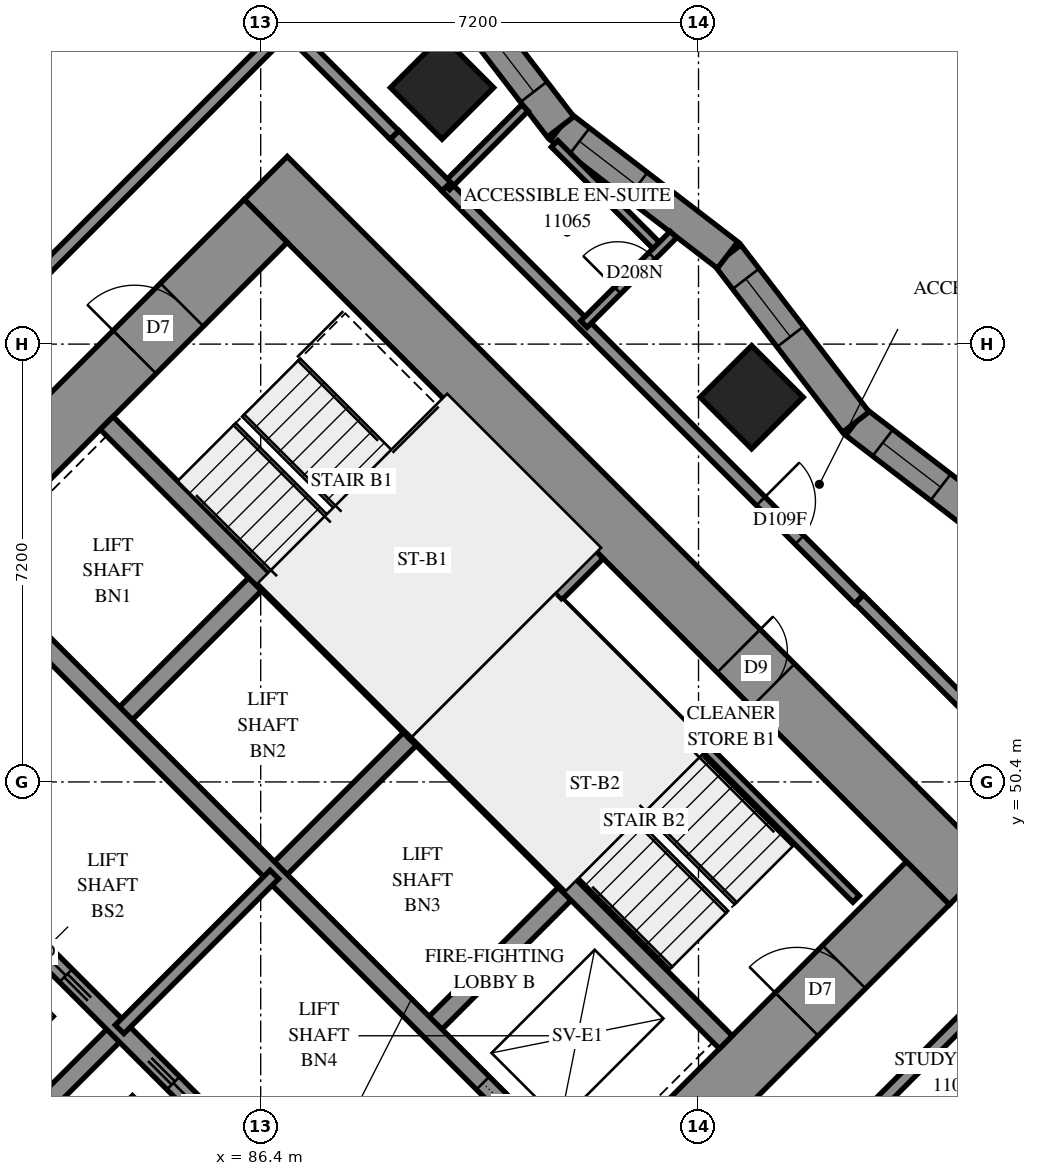
"""IFC4 building model, lengths in metres.
Left out: names, types, materials, properties, quantities, classifications, styles, units other than length and angle.
Written with IfcOpenShell. Run it as: python <this file> out.ifc"""

import sys

from ifc_helpers import new_model, si_unit, direction, frame, frame_2d, origin, origin_2d, place, context, subcontext, project, spatial, polyline, rectangle, outline, extrude, element, fill, save


model = new_model("IFC4")
c1 = context("Model", 3, precision=1e-05, world=origin(), true_north=direction((0.0, 1.0)))
c2 = subcontext(c1, "Body", "Model", "MODEL_VIEW")
j1 = project(units=[si_unit("LENGTHUNIT", "METRE"), si_unit("PLANEANGLEUNIT", "RADIAN")], contexts=[c1])
p1 = place(None, origin())
s1 = spatial("IfcSite", under=j1, at=p1, CompositionType="ELEMENT")
p2 = place(p1, origin())
s2 = spatial("IfcBuilding", under=s1, at=p2, CompositionType="ELEMENT")
p3 = place(p2, frame((0.0, 0.0, 44.0)))
s3 = spatial("IfcBuildingStorey", under=s2, at=p3, CompositionType="ELEMENT", Elevation=44.0)
for number, where, z_axis, x_axis in (
    (1, (89.382, 61.818, 0.0), (0.0, 0.0, 1.0), (0.707, -0.707, 0.0)),
    (2, (94.474, 56.727, 0.0), (0.0, 0.0, 1.0), (0.707, -0.707, 0.0)),
):
    element("IfcColumn", number, at=place(p3, frame(where, z_axis=z_axis, x_axis=x_axis)), inside=s3, PredefinedType="COLUMN", context=c2, shape_type="SweptSolid", body=[
        extrude(rectangle(XDim=1.2, YDim=1.2, at=origin_2d()), origin(), (0.0, 0.0, 1.0), 3.1),
    ])
p4 = place(p3, frame((75.594, 49.443, -0.3), z_axis=(0.0, 0.0, 1.0), x_axis=(0.7071037324, -0.70710983, 0.0)))
e3 = element("IfcWall", 3, at=p4, inside=s3, PredefinedType="SHEAR", context=c2, shape_type="SweptSolid", body=[
    extrude(rectangle(XDim=16.4, YDim=1.0, at=frame_2d((8.2, 0.0))), origin(), (0.0, 0.0, 1.0), 2.7),
])
p5 = place(p3, frame((86.483, 60.333, -0.3), z_axis=(0.0, 0.0, 1.0), x_axis=(0.70710983, -0.7071037324, 0.0)))
e4 = element("IfcWall", 4, at=p5, inside=s3, PredefinedType="SHEAR", context=c2, shape_type="SweptSolid", body=[
    extrude(rectangle(XDim=16.4, YDim=1.0, at=frame_2d((8.2, 0.0))), origin(), (0.0, 0.0, 1.0), 2.7),
])
p6 = place(p5, frame((11.0, 0.0, 0.3)))
e5 = element("IfcOpeningElement", 5, at=p6, cuts=e4, PredefinedType="OPENING", context=c2, shape_type="SweptSolid", body=[
    extrude(rectangle(XDim=0.8, YDim=2.1, at=frame_2d((0.4, 1.05))), frame((0.0, 0.51, 0.0), z_axis=(0.0, -1.0, 0.0), x_axis=(1.0, 0.0, 0.0)), (0.0, 0.0, 1.0), 1.02),
])
p7 = place(p3, frame((76.301, 49.443, -0.3), z_axis=(0.0, 0.0, 1.0), x_axis=(0.7071067812, 0.7071067812, 0.0)))
e6 = element("IfcWall", 6, at=p7, inside=s3, PredefinedType="SHEAR", context=c2, shape_type="SweptSolid", body=[
    extrude(rectangle(XDim=14.4, YDim=1.0, at=frame_2d((7.2, 0.0))), origin(), (0.0, 0.0, 1.0), 2.7),
])
p8 = place(p7, frame((4.55, 0.0, 0.3)))
e7 = element("IfcOpeningElement", 7, at=p8, cuts=e6, PredefinedType="OPENING", context=c2, shape_type="SweptSolid", body=[
    extrude(rectangle(XDim=1.1, YDim=2.1, at=frame_2d((0.55, 1.05))), frame((0.0, 0.51, 0.0), z_axis=(0.0, -1.0, 0.0), x_axis=(1.0, 0.0, 0.0)), (0.0, 0.0, 1.0), 1.02),
])
p9 = place(p7, frame((11.35, 0.0, 0.3)))
e8 = element("IfcOpeningElement", 8, at=p9, cuts=e6, PredefinedType="OPENING", context=c2, shape_type="SweptSolid", body=[
    extrude(rectangle(XDim=1.1, YDim=2.1, at=frame_2d((0.55, 1.05))), frame((0.0, 0.51, 0.0), z_axis=(0.0, -1.0, 0.0), x_axis=(1.0, 0.0, 0.0)), (0.0, 0.0, 1.0), 1.02),
])
p10 = place(p3, frame((87.19, 38.554, -0.3), z_axis=(0.0, 0.0, 1.0), x_axis=(0.707103309, 0.7071102534, 0.0)))
e9 = element("IfcWall", 9, at=p10, inside=s3, PredefinedType="SHEAR", context=c2, shape_type="SweptSolid", body=[
    extrude(rectangle(XDim=14.4, YDim=1.0, at=frame_2d((7.2, 0.0))), origin(), (0.0, 0.0, 1.0), 2.7),
])
p11 = place(p10, frame((4.55, 0.0, 0.3)))
e10 = element("IfcOpeningElement", 10, at=p11, cuts=e9, PredefinedType="OPENING", context=c2, shape_type="SweptSolid", body=[
    extrude(rectangle(XDim=1.1, YDim=2.1, at=frame_2d((0.55, 1.05))), frame((0.0, 0.51, 0.0), z_axis=(0.0, -1.0, 0.0), x_axis=(1.0, 0.0, 0.0)), (0.0, 0.0, 1.0), 1.02),
])
p12 = place(p10, frame((11.35, 0.0, 0.3)))
e11 = element("IfcOpeningElement", 11, at=p12, cuts=e9, PredefinedType="OPENING", context=c2, shape_type="SweptSolid", body=[
    extrude(rectangle(XDim=1.1, YDim=2.1, at=frame_2d((0.55, 1.05))), frame((0.0, 0.51, 0.0), z_axis=(0.0, -1.0, 0.0), x_axis=(1.0, 0.0, 0.0)), (0.0, 0.0, 1.0), 1.02),
])
p13 = place(p3, frame((84.079, 51.423, 0.0), z_axis=(0.0, 0.0, 1.0), x_axis=(0.7071219326, 0.7070916295, 0.0)))
e12 = element("IfcWall", 12, at=p13, inside=s3, PredefinedType="SOLIDWALL", context=c2, shape_type="SweptSolid", body=[
    extrude(rectangle(XDim=3.3, YDim=0.3, at=frame_2d((1.65, 0.0))), origin(), (0.0, 0.0, 1.0), 3.1),
])
p14 = place(p3, frame((81.746, 43.999, 0.0), z_axis=(0.0, 0.0, 1.0), x_axis=(0.7071067812, 0.7071067812, 0.0)))
e13 = element("IfcWall", 13, at=p14, inside=s3, PredefinedType="SOLIDWALL", context=c2, shape_type="SweptSolid", body=[
    extrude(rectangle(XDim=3.3, YDim=0.3, at=frame_2d((1.65, 0.0))), origin(), (0.0, 0.0, 1.0), 3.1),
])
for number, where, z_axis, x_axis in (
    (14, (86.625, 48.878, 0.0), (0.0, 0.0, 1.0), (0.707, 0.707, 0.0)),
    (15, (89.17, 46.332, 0.0), (0.0, 0.0, 1.0), (0.707, 0.707, 0.0)),
):
    element("IfcWall", number, at=place(p3, frame(where, z_axis=z_axis, x_axis=x_axis)), inside=s3, PredefinedType="SOLIDWALL", context=c2, shape_type="SweptSolid", body=[
        extrude(rectangle(XDim=3.3, YDim=0.3, at=frame_2d((1.65, 0.0))), origin(), (0.0, 0.0, 1.0), 3.1),
    ])
p15 = place(p3, frame((78.988, 51.423, 0.0), z_axis=(0.0, 0.0, 1.0), x_axis=(0.7071067812, -0.7071067812, 0.0)))
e16 = element("IfcWall", 16, at=p15, inside=s3, PredefinedType="SOLIDWALL", context=c2, shape_type="SweptSolid", body=[
    extrude(rectangle(XDim=14.4, YDim=0.3, at=frame_2d((7.2, 0.0))), origin(), (0.0, 0.0, 1.0), 3.1),
])
p16 = place(p15, frame((1.25, 0.0, 0.0)))
e17 = element("IfcOpeningElement", 17, at=p16, cuts=e16, PredefinedType="OPENING", context=c2, shape_type="SweptSolid", body=[
    extrude(rectangle(XDim=1.1, YDim=2.1, at=frame_2d((0.55, 1.05))), frame((0.0, 0.16, 0.0), z_axis=(0.0, -1.0, 0.0), x_axis=(1.0, 0.0, 0.0)), (0.0, 0.0, 1.0), 0.32),
])
p17 = place(p15, frame((4.85, 0.0, 0.0)))
e18 = element("IfcOpeningElement", 18, at=p17, cuts=e16, PredefinedType="OPENING", context=c2, shape_type="SweptSolid", body=[
    extrude(rectangle(XDim=1.1, YDim=2.1, at=frame_2d((0.55, 1.05))), frame((0.0, 0.16, 0.0), z_axis=(0.0, -1.0, 0.0), x_axis=(1.0, 0.0, 0.0)), (0.0, 0.0, 1.0), 0.32),
])
p18 = place(p15, frame((8.45, 0.0, 0.0)))
e19 = element("IfcOpeningElement", 19, at=p18, cuts=e16, PredefinedType="OPENING", context=c2, shape_type="SweptSolid", body=[
    extrude(rectangle(XDim=1.1, YDim=2.1, at=frame_2d((0.55, 1.05))), frame((0.0, 0.16, 0.0), z_axis=(0.0, -1.0, 0.0), x_axis=(1.0, 0.0, 0.0)), (0.0, 0.0, 1.0), 0.32),
])
p19 = place(p15, frame((12.05, 0.0, 0.0)))
e20 = element("IfcOpeningElement", 20, at=p19, cuts=e16, PredefinedType="OPENING", context=c2, shape_type="SweptSolid", body=[
    extrude(rectangle(XDim=1.1, YDim=2.1, at=frame_2d((0.55, 1.05))), frame((0.0, 0.16, 0.0), z_axis=(0.0, -1.0, 0.0), x_axis=(1.0, 0.0, 0.0)), (0.0, 0.0, 1.0), 0.32),
])
p20 = place(p3, frame((81.534, 53.969, 0.0), z_axis=(0.0, 0.0, 1.0), x_axis=(0.707103309, -0.7071102534, 0.0)))
e21 = element("IfcWall", 21, at=p20, inside=s3, PredefinedType="SOLIDWALL", context=c2, shape_type="SweptSolid", body=[
    extrude(rectangle(XDim=14.4, YDim=0.3, at=frame_2d((7.2, 0.0))), origin(), (0.0, 0.0, 1.0), 3.1),
])
p21 = place(p20, frame((12.05, 0.0, 0.0)))
e22 = element("IfcOpeningElement", 22, at=p21, cuts=e21, PredefinedType="OPENING", context=c2, shape_type="SweptSolid", body=[
    extrude(rectangle(XDim=1.1, YDim=2.1, at=frame_2d((0.55, 1.05))), frame((0.0, 0.16, 0.0), z_axis=(0.0, -1.0, 0.0), x_axis=(1.0, 0.0, 0.0)), (0.0, 0.0, 1.0), 0.32),
])
for number, where, z_axis, x_axis in (
    (23, (83.867, 56.302, 0.0), (0.0, 0.0, 1.0), (0.707, -0.707, 0.0)),
    (24, (88.958, 51.211, 0.0), (0.0, 0.0, 1.0), (0.707, -0.707, 0.0)),
):
    element("IfcWall", number, at=place(p3, frame(where, z_axis=z_axis, x_axis=x_axis)), inside=s3, PredefinedType="SOLIDWALL", context=c2, shape_type="SweptSolid", body=[
        extrude(rectangle(XDim=7.2, YDim=0.3, at=frame_2d((3.6, 0.0))), origin(), (0.0, 0.0, 1.0), 3.1),
    ])
p22 = place(p3, frame((88.958, 51.211, 0.0), z_axis=(0.0, 0.0, 1.0), x_axis=(0.7071067812, 0.7071067812, 0.0)))
e25 = element("IfcWall", 25, at=p22, inside=s3, PredefinedType="SOLIDWALL", context=c2, shape_type="SweptSolid", body=[
    extrude(rectangle(XDim=4.2, YDim=0.3, at=frame_2d((2.1, 0.0))), origin(), (0.0, 0.0, 1.0), 3.1),
])
p23 = place(p3, frame((98.934, 54.209, 0.0), z_axis=(0.0, 0.0, 1.0), x_axis=(-0.7931776144, 0.6089903711, 0.0)))
e26 = element("IfcWall", 26, at=p23, inside=s3, PredefinedType="SOLIDWALL", context=c2, shape_type="SweptSolid", body=[
    extrude(outline(polyline([(-0.036, -0.275), (3.427, -0.275), (3.499, 0.275), (0.036, 0.275), (-0.036, -0.275)])), origin(), (0.0, 0.0, 1.0), 3.1),
])
p24 = place(p23, frame((1.704, 0.0, 0.5)))
e27 = element("IfcOpeningElement", 27, at=p24, cuts=e26, PredefinedType="OPENING", context=c2, shape_type="SweptSolid", body=[
    extrude(rectangle(XDim=1.2, YDim=2.45, at=frame_2d((0.6, 1.225))), frame((0.0, 0.285, 0.0), z_axis=(0.0, -1.0, 0.0), x_axis=(1.0, 0.0, 0.0)), (0.0, 0.0, 1.0), 0.57),
])
p25 = place(p3, frame((96.187, 56.318, 0.0), z_axis=(0.0, 0.0, 1.0), x_axis=(-0.6089903711, 0.7931776144, 0.0)))
e28 = element("IfcWall", 28, at=p25, inside=s3, PredefinedType="SOLIDWALL", context=c2, shape_type="SweptSolid", body=[
    extrude(outline(polyline([(0.036, -0.275), (3.499, -0.275), (3.427, 0.275), (-0.036, 0.275), (0.036, -0.275)])), origin(), (0.0, 0.0, 1.0), 3.1),
])
p26 = place(p25, frame((1.77, 0.0, 0.5)))
e29 = element("IfcOpeningElement", 29, at=p26, cuts=e28, PredefinedType="OPENING", context=c2, shape_type="SweptSolid", body=[
    extrude(rectangle(XDim=1.2, YDim=2.45, at=frame_2d((0.6, 1.225))), frame((0.0, 0.285, 0.0), z_axis=(0.0, -1.0, 0.0), x_axis=(1.0, 0.0, 0.0)), (0.0, 0.0, 1.0), 0.57),
])
p27 = place(p3, frame((94.078, 59.065, 0.0), z_axis=(0.0, 0.0, 1.0), x_axis=(-0.7931776144, 0.6089903711, 0.0)))
e30 = element("IfcWall", 30, at=p27, inside=s3, PredefinedType="SOLIDWALL", context=c2, shape_type="SweptSolid", body=[
    extrude(outline(polyline([(-0.036, -0.275), (3.427, -0.275), (3.499, 0.275), (0.036, 0.275), (-0.036, -0.275)])), origin(), (0.0, 0.0, 1.0), 3.1),
])
p28 = place(p27, frame((1.872, 0.0, 0.5)))
e31 = element("IfcOpeningElement", 31, at=p28, cuts=e30, PredefinedType="OPENING", context=c2, shape_type="SweptSolid", body=[
    extrude(rectangle(XDim=1.2, YDim=2.45, at=frame_2d((0.6, 1.225))), frame((0.0, 0.285, 0.0), z_axis=(0.0, -1.0, 0.0), x_axis=(1.0, 0.0, 0.0)), (0.0, 0.0, 1.0), 0.57),
])
p29 = place(p3, frame((91.332, 61.173, 0.0), z_axis=(0.0, 0.0, 1.0), x_axis=(-0.6089903711, 0.7931776144, 0.0)))
e32 = element("IfcWall", 32, at=p29, inside=s3, PredefinedType="SOLIDWALL", context=c2, shape_type="SweptSolid", body=[
    extrude(outline(polyline([(0.036, -0.275), (3.499, -0.275), (3.427, 0.275), (-0.036, 0.275), (0.036, -0.275)])), origin(), (0.0, 0.0, 1.0), 3.1),
])
p30 = place(p29, frame((0.725, 0.0, 0.5)))
e33 = element("IfcOpeningElement", 33, at=p30, cuts=e32, PredefinedType="OPENING", context=c2, shape_type="SweptSolid", body=[
    extrude(rectangle(XDim=1.2, YDim=2.45, at=frame_2d((0.6, 1.225))), frame((0.0, 0.285, 0.0), z_axis=(0.0, -1.0, 0.0), x_axis=(1.0, 0.0, 0.0)), (0.0, 0.0, 1.0), 0.57),
])
p31 = place(p3, frame((91.313, 53.354, 0.0), z_axis=(0.0, 0.0, 1.0), x_axis=(0.7071140275, -0.7070995348, 0.0)))
e34 = element("IfcWall", 34, at=p31, inside=s3, PredefinedType="PARTITIONING", context=c2, shape_type="SweptSolid", body=[
    extrude(rectangle(XDim=6.9, YDim=0.15, at=frame_2d((3.45, 0.0))), origin(), (0.0, 0.0, 1.0), 3.1),
])
p32 = place(p3, frame((84.079, 46.332, 0.0), z_axis=(0.0, 0.0, 1.0), x_axis=(0.7071067812, 0.7071067812, 0.0)))
e35 = element("IfcWall", 35, at=p32, inside=s3, PredefinedType="PARTITIONING", context=c2, shape_type="SweptSolid", body=[
    extrude(rectangle(XDim=3.6, YDim=0.2, at=frame_2d((1.8, 0.0))), origin(), (0.0, 0.0, 1.0), 3.1),
])
p33 = place(p3, frame((94.367, 41.349, 0.0), z_axis=(0.0, 0.0, 1.0), x_axis=(0.7071109781, 0.7071025843, 0.0)))
e36 = element("IfcWall", 36, at=p33, inside=s3, PredefinedType="PARTITIONING", context=c2, shape_type="SweptSolid", body=[
    extrude(rectangle(XDim=11.914, YDim=0.2, at=frame_2d((5.957, 0.0))), origin(), (0.0, 0.0, 1.0), 3.1),
])
p34 = place(p3, frame((79.871, 55.843, 0.0), z_axis=(0.0, 0.0, 1.0), x_axis=(0.7071067812, 0.7071067812, 0.0)))
e37 = element("IfcWall", 37, at=p34, inside=s3, PredefinedType="PARTITIONING", context=c2, shape_type="SweptSolid", body=[
    extrude(rectangle(XDim=9.85, YDim=0.2, at=frame_2d((4.925, 0.0))), origin(), (0.0, 0.0, 1.0), 3.1),
])
p35 = place(p34, frame((1.135, 0.0, 0.0)))
e38 = element("IfcOpeningElement", 38, at=p35, cuts=e37, PredefinedType="OPENING", context=c2, shape_type="SweptSolid", body=[
    extrude(rectangle(XDim=1.0, YDim=2.1, at=frame_2d((0.5, 1.05))), frame((0.0, 0.11, 0.0), z_axis=(0.0, -1.0, 0.0), x_axis=(1.0, 0.0, 0.0)), (0.0, 0.0, 1.0), 0.22),
])
p36 = place(p3, frame((93.59, 42.126, 0.0), z_axis=(0.0, 0.0, 1.0), x_axis=(0.7071067812, 0.7071067812, 0.0)))
e39 = element("IfcWall", 39, at=p36, inside=s3, PredefinedType="PARTITIONING", context=c2, shape_type="SweptSolid", body=[
    extrude(rectangle(XDim=9.849, YDim=0.2, at=frame_2d((4.924, 0.0))), origin(), (0.0, 0.0, 1.0), 3.1),
])
p37 = place(p36, frame((0.148, 0.0, 0.0)))
e40 = element("IfcOpeningElement", 40, at=p37, cuts=e39, PredefinedType="OPENING", context=c2, shape_type="SweptSolid", body=[
    extrude(rectangle(XDim=1.0, YDim=2.1, at=frame_2d((0.5, 1.05))), frame((0.0, 0.11, 0.0), z_axis=(0.0, -1.0, 0.0), x_axis=(1.0, 0.0, 0.0)), (0.0, 0.0, 1.0), 0.22),
])
p38 = place(p3, frame((89.451, 60.189, 0.0), z_axis=(0.0, 0.0, 1.0), x_axis=(0.7071796965, -0.7070338583, 0.0)))
e41 = element("IfcWall", 41, at=p38, inside=s3, PredefinedType="PARTITIONING", context=c2, shape_type="SweptSolid", body=[
    extrude(rectangle(XDim=9.6, YDim=0.2, at=frame_2d((4.8, 0.0))), origin(), (0.0, 0.0, 1.0), 3.1),
])
p39 = place(p38, frame((7.315, 0.0, 0.0)))
e42 = element("IfcOpeningElement", 42, at=p39, cuts=e41, PredefinedType="OPENING", context=c2, shape_type="SweptSolid", body=[
    extrude(rectangle(XDim=0.9, YDim=2.1, at=frame_2d((0.45, 1.05))), frame((0.0, 0.11, 0.0), z_axis=(0.0, -1.0, 0.0), x_axis=(1.0, 0.0, 0.0)), (0.0, 0.0, 1.0), 0.22),
])
p40 = place(p3, frame((96.244, 53.406, 0.0), z_axis=(0.0, 0.0, 1.0), x_axis=(0.7068288851, -0.7073845681, 0.0)))
e43 = element("IfcWall", 43, at=p40, inside=s3, PredefinedType="PARTITIONING", context=c2, shape_type="SweptSolid", body=[
    extrude(rectangle(XDim=3.599, YDim=0.2, at=frame_2d((1.8, 0.0))), origin(), (0.0, 0.0, 1.0), 3.1),
])
p41 = place(p3, frame((86.835, 62.803, 0.0), z_axis=(0.0, 0.0, 1.0), x_axis=(0.7071067812, -0.7071067812, 0.0)))
e44 = element("IfcWall", 44, at=p41, inside=s3, PredefinedType="PARTITIONING", context=c2, shape_type="SweptSolid", body=[
    extrude(rectangle(XDim=2.498, YDim=0.2, at=frame_2d((1.249, 0.0))), origin(), (0.0, 0.0, 1.0), 3.1),
])
p42 = place(p3, frame((91.233, 60.894, 0.0), z_axis=(0.0, 0.0, 1.0), x_axis=(0.7071272785, -0.7070862833, 0.0)))
e45 = element("IfcWall", 45, at=p42, inside=s3, PredefinedType="PARTITIONING", context=c2, shape_type="SweptSolid", body=[
    extrude(rectangle(XDim=2.439, YDim=0.15, at=frame_2d((1.22, 0.0))), origin(), (0.0, 0.0, 1.0), 3.1),
])
p43 = place(p3, frame((91.715, 57.929, 0.0), z_axis=(0.0, 0.0, 1.0), x_axis=(0.7070827712, 0.7071307904, 0.0)))
e46 = element("IfcWall", 46, at=p43, inside=s3, PredefinedType="PARTITIONING", context=c2, shape_type="SweptSolid", body=[
    extrude(rectangle(XDim=2.083, YDim=0.15, at=frame_2d((1.041, 0.0))), origin(), (0.0, 0.0, 1.0), 3.1),
])
p44 = place(p43, frame((0.784, 0.0, 0.0)))
e47 = element("IfcOpeningElement", 47, at=p44, cuts=e46, PredefinedType="OPENING", context=c2, shape_type="SweptSolid", body=[
    extrude(rectangle(XDim=0.8, YDim=2.1, at=frame_2d((0.4, 1.05))), frame((0.0, 0.085, 0.0), z_axis=(0.0, -1.0, 0.0), x_axis=(1.0, 0.0, 0.0)), (0.0, 0.0, 1.0), 0.17),
])
p45 = place(p3, frame((89.453, 60.193, 0.0), z_axis=(0.0, 0.0, 1.0), x_axis=(0.7071067812, 0.7071067812, 0.0)))
e48 = element("IfcWall", 48, at=p45, inside=s3, PredefinedType="PARTITIONING", context=c2, shape_type="SweptSolid", body=[
    extrude(rectangle(XDim=1.828, YDim=0.15, at=frame_2d((0.914, 0.0))), origin(), (0.0, 0.0, 1.0), 3.1),
])
p46 = place(p3, frame((88.603, 61.039, 0.0), z_axis=(0.0, 0.0, 1.0), x_axis=(0.7079391603, -0.7062734211, 0.0)))
e49 = element("IfcWall", 49, at=p46, inside=s3, PredefinedType="PARTITIONING", context=c2, shape_type="SweptSolid", body=[
    extrude(rectangle(XDim=1.201, YDim=0.2, at=frame_2d((0.6, 0.0))), origin(), (0.0, 0.0, 1.0), 3.1),
])
p47 = place(p24, origin())
e50 = element("IfcWindow", 50, at=p47, inside=s3, PartitioningType="SINGLE_PANEL", PredefinedType="WINDOW", context=c2, shape_type="SweptSolid", body=[
    extrude(rectangle(XDim=1.2, YDim=2.45, at=frame_2d((0.6, 1.225))), frame((0.0, 0.155, 0.0), z_axis=(0.0, -1.0, 0.0), x_axis=(1.0, 0.0, 0.0)), (0.0, 0.0, 1.0), 0.06),
])
fill(e27, e50)
p48 = place(p26, origin())
e51 = element("IfcWindow", 51, at=p48, inside=s3, PartitioningType="SINGLE_PANEL", PredefinedType="WINDOW", context=c2, shape_type="SweptSolid", body=[
    extrude(rectangle(XDim=1.2, YDim=2.45, at=frame_2d((0.6, 1.225))), frame((0.0, 0.155, 0.0), z_axis=(0.0, -1.0, 0.0), x_axis=(1.0, 0.0, 0.0)), (0.0, 0.0, 1.0), 0.06),
])
fill(e29, e51)
p49 = place(p28, origin())
e52 = element("IfcWindow", 52, at=p49, inside=s3, PartitioningType="SINGLE_PANEL", PredefinedType="WINDOW", context=c2, shape_type="SweptSolid", body=[
    extrude(rectangle(XDim=1.2, YDim=2.45, at=frame_2d((0.6, 1.225))), frame((0.0, 0.155, 0.0), z_axis=(0.0, -1.0, 0.0), x_axis=(1.0, 0.0, 0.0)), (0.0, 0.0, 1.0), 0.06),
])
fill(e31, e52)
p50 = place(p30, origin())
e53 = element("IfcWindow", 53, at=p50, inside=s3, PartitioningType="SINGLE_PANEL", PredefinedType="WINDOW", context=c2, shape_type="SweptSolid", body=[
    extrude(rectangle(XDim=1.2, YDim=2.45, at=frame_2d((0.6, 1.225))), frame((0.0, 0.155, 0.0), z_axis=(0.0, -1.0, 0.0), x_axis=(1.0, 0.0, 0.0)), (0.0, 0.0, 1.0), 0.06),
])
fill(e33, e53)
p51 = place(p6, origin())
e54 = element("IfcDoor", 54, at=p51, inside=s3, OperationType="SINGLE_SWING_RIGHT", PredefinedType="DOOR", context=c2, shape_type="SweptSolid", body=[
    extrude(rectangle(XDim=0.8, YDim=2.1, at=frame_2d((0.4, 1.05))), frame((0.0, -0.44, 0.0), z_axis=(0.0, -1.0, 0.0), x_axis=(1.0, 0.0, 0.0)), (0.0, 0.0, 1.0), 0.05),
])
fill(e5, e54)
p52 = place(p9, origin())
e55 = element("IfcDoor", 55, at=p52, inside=s3, OperationType="SINGLE_SWING_LEFT", PredefinedType="DOOR", context=c2, shape_type="SweptSolid", body=[
    extrude(rectangle(XDim=1.1, YDim=2.1, at=frame_2d((0.55, 1.05))), frame((0.0, 0.025, 0.0), z_axis=(0.0, -1.0, 0.0), x_axis=(1.0, 0.0, 0.0)), (0.0, 0.0, 1.0), 0.05),
])
fill(e8, e55)
p53 = place(p12, origin())
e56 = element("IfcDoor", 56, at=p53, inside=s3, OperationType="SINGLE_SWING_RIGHT", PredefinedType="DOOR", context=c2, shape_type="SweptSolid", body=[
    extrude(rectangle(XDim=1.1, YDim=2.1, at=frame_2d((0.55, 1.05))), frame((0.0, 0.025, 0.0), z_axis=(0.0, -1.0, 0.0), x_axis=(1.0, 0.0, 0.0)), (0.0, 0.0, 1.0), 0.05),
])
fill(e11, e56)
p54 = place(p17, origin())
e57 = element("IfcDoor", 57, at=p54, inside=s3, OperationType="SLIDING_TO_RIGHT", PredefinedType="DOOR", context=c2, shape_type="SweptSolid", body=[
    extrude(rectangle(XDim=1.1, YDim=2.1, at=frame_2d((0.55, 1.05))), frame((0.0, 0.025, 0.0), z_axis=(0.0, -1.0, 0.0), x_axis=(1.0, 0.0, 0.0)), (0.0, 0.0, 1.0), 0.05),
])
fill(e18, e57)
p55 = place(p18, origin())
e58 = element("IfcDoor", 58, at=p55, inside=s3, OperationType="SLIDING_TO_LEFT", PredefinedType="DOOR", context=c2, shape_type="SweptSolid", body=[
    extrude(rectangle(XDim=1.1, YDim=2.1, at=frame_2d((0.55, 1.05))), frame((0.0, 0.025, 0.0), z_axis=(0.0, -1.0, 0.0), x_axis=(1.0, 0.0, 0.0)), (0.0, 0.0, 1.0), 0.05),
])
fill(e19, e58)
p56 = place(p21, origin())
e59 = element("IfcDoor", 59, at=p56, inside=s3, OperationType="SLIDING_TO_RIGHT", PredefinedType="DOOR", context=c2, shape_type="SweptSolid", body=[
    extrude(rectangle(XDim=1.1, YDim=2.1, at=frame_2d((0.55, 1.05))), frame((0.0, 0.025, 0.0), z_axis=(0.0, -1.0, 0.0), x_axis=(1.0, 0.0, 0.0)), (0.0, 0.0, 1.0), 0.05),
])
fill(e22, e59)
p57 = place(p39, origin())
e60 = element("IfcDoor", 60, at=p57, inside=s3, OperationType="SINGLE_SWING_LEFT", PredefinedType="DOOR", context=c2, shape_type="SweptSolid", body=[
    extrude(rectangle(XDim=0.9, YDim=2.1, at=frame_2d((0.45, 1.05))), frame((0.0, 0.025, 0.0), z_axis=(0.0, -1.0, 0.0), x_axis=(1.0, 0.0, 0.0)), (0.0, 0.0, 1.0), 0.05),
])
fill(e42, e60)
p58 = place(p44, origin())
e61 = element("IfcDoor", 61, at=p58, inside=s3, OperationType="SINGLE_SWING_RIGHT", PredefinedType="DOOR", context=c2, shape_type="SweptSolid", body=[
    extrude(rectangle(XDim=0.8, YDim=2.1, at=frame_2d((0.4, 1.05))), frame((0.0, 0.025, 0.0), z_axis=(0.0, -1.0, 0.0), x_axis=(1.0, 0.0, 0.0)), (0.0, 0.0, 1.0), 0.05),
])
fill(e47, e61)
save(model, sys.argv[1])
